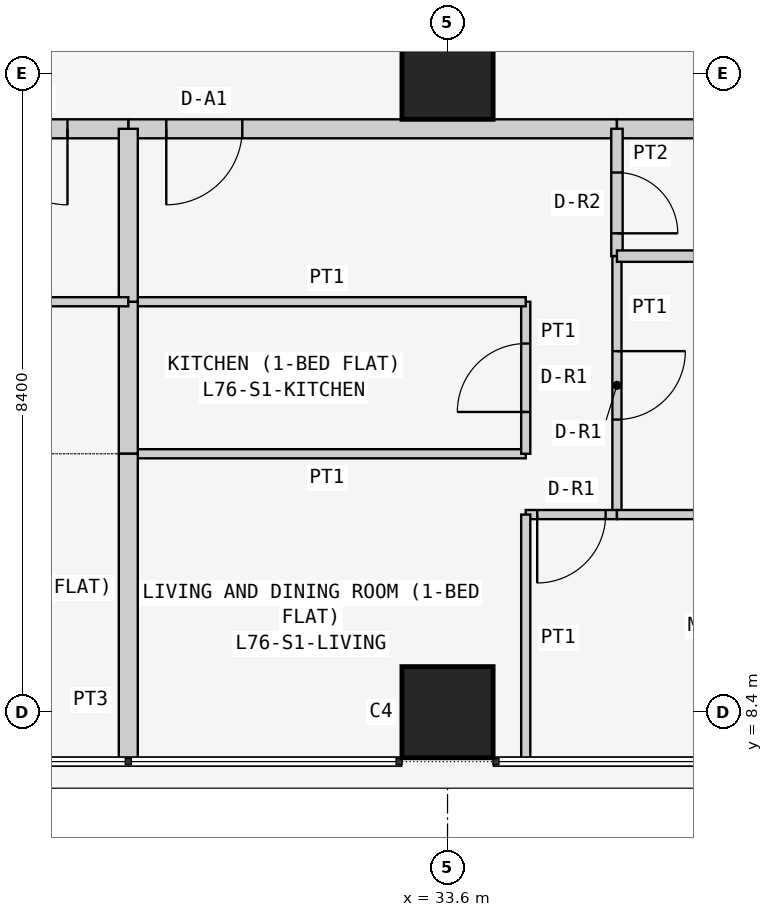
"""IFC4 building model, lengths in metres.
Left out: names, types, materials, properties, quantities, classifications, styles, units other than length and angle.
Written with IfcOpenShell. Run it as: python <this file> out.ifc"""

import sys

from ifc_helpers import new_model, si_unit, direction, frame, frame_2d, origin, origin_2d, place, context, subcontext, project, spatial, rectangle, extrude, element, fill, save


model = new_model("IFC4")
c1 = context("Model", 3, precision=1e-05, world=origin(), true_north=direction((0.0, 1.0)))
c2 = subcontext(c1, "Body", "Model", "MODEL_VIEW")
j1 = project(units=[si_unit("LENGTHUNIT", "METRE"), si_unit("PLANEANGLEUNIT", "RADIAN")], contexts=[c1])
p1 = place(None, origin())
s1 = spatial("IfcSite", under=j1, at=p1, CompositionType="ELEMENT")
p2 = place(p1, origin())
s2 = spatial("IfcBuilding", under=s1, at=p2, CompositionType="ELEMENT")
p3 = place(p2, frame((0.0, 0.0, 290.1)))
s3 = spatial("IfcBuildingStorey", under=s2, at=p3, CompositionType="ELEMENT", Elevation=290.1)
for number, where, z_axis, x_axis in (
    (1, (33.6, 8.4, 0.0), (0.0, 0.0, 1.0), (1.0, 0.0, 0.0)),
    (2, (33.6, 16.8, 0.0), (0.0, 0.0, 1.0), (1.0, 0.0, 0.0)),
):
    element("IfcColumn", number, at=place(p3, frame(where, z_axis=z_axis, x_axis=x_axis)), inside=s3, PredefinedType="COLUMN", context=c2, shape_type="SweptSolid", body=[
        extrude(rectangle(XDim=1.2, YDim=1.2, at=origin_2d()), origin(), (0.0, 0.0, 1.0), 3.6),
    ])
p4 = place(p3, frame((35.829, 16.075, 0.0), z_axis=(0.0, 0.0, 1.0), x_axis=(-1.0, 0.0, 0.0)))
e3 = element("IfcWall", 3, at=p4, inside=s3, PredefinedType="PARTITIONING", context=c2, shape_type="SweptSolid", body=[
    extrude(rectangle(XDim=6.429, YDim=0.25, at=frame_2d((3.215, 0.0))), origin(), (0.0, 0.0, 1.0), 3.45),
])
p5 = place(p4, frame((4.929, 0.0, 0.0)))
e4 = element("IfcOpeningElement", 4, at=p5, cuts=e3, PredefinedType="OPENING", context=c2, shape_type="SweptSolid", body=[
    extrude(rectangle(XDim=1.0, YDim=2.1, at=frame_2d((0.5, 1.05))), frame((0.0, 0.135, 0.0), z_axis=(0.0, -1.0, 0.0), x_axis=(1.0, 0.0, 0.0)), (0.0, 0.0, 1.0), 0.27),
])
p6 = place(p3, frame((42.7, 16.075, 0.0), z_axis=(0.0, 0.0, 1.0), x_axis=(-1.0, 0.0, 0.0)))
e5 = element("IfcWall", 5, at=p6, inside=s3, PredefinedType="PARTITIONING", context=c2, shape_type="SweptSolid", body=[
    extrude(rectangle(XDim=6.871, YDim=0.25, at=frame_2d((3.436, 0.0))), origin(), (0.0, 0.0, 1.0), 3.45),
])
p7 = place(p3, frame((29.4, 16.075, 0.0), z_axis=(0.0, 0.0, 1.0), x_axis=(-1.0, 0.0, 0.0)))
e6 = element("IfcWall", 6, at=p7, inside=s3, PredefinedType="PARTITIONING", context=c2, shape_type="SweptSolid", body=[
    extrude(rectangle(XDim=7.5, YDim=0.25, at=frame_2d((3.75, 0.0))), origin(), (0.0, 0.0, 1.0), 3.45),
])
p8 = place(p7, frame((0.8, 0.0, 0.0)))
e7 = element("IfcOpeningElement", 7, at=p8, cuts=e6, PredefinedType="OPENING", context=c2, shape_type="SweptSolid", body=[
    extrude(rectangle(XDim=1.0, YDim=2.1, at=frame_2d((0.5, 1.05))), frame((0.0, 0.135, 0.0), z_axis=(0.0, -1.0, 0.0), x_axis=(1.0, 0.0, 0.0)), (0.0, 0.0, 1.0), 0.27),
])
p9 = place(p3, frame((29.4, 11.8, 0.0), z_axis=(0.0, 0.0, 1.0), x_axis=(1.0, 0.0, 0.0)))
e8 = element("IfcWall", 8, at=p9, inside=s3, PredefinedType="PARTITIONING", context=c2, shape_type="SweptSolid", body=[
    extrude(rectangle(XDim=5.229, YDim=0.12, at=frame_2d((2.615, 0.0))), origin(), (0.0, 0.0, 1.0), 3.45),
])
p10 = place(p3, frame((34.629, 11.8, 0.0), z_axis=(0.0, 0.0, 1.0), x_axis=(0.0, 1.0, 0.0)))
e9 = element("IfcWall", 9, at=p10, inside=s3, PredefinedType="PARTITIONING", context=c2, shape_type="SweptSolid", body=[
    extrude(rectangle(XDim=2.0, YDim=0.12, at=frame_2d((1.0, 0.0))), origin(), (0.0, 0.0, 1.0), 3.45),
])
p11 = place(p10, frame((0.55, 0.0, 0.0)))
e10 = element("IfcOpeningElement", 10, at=p11, cuts=e9, PredefinedType="OPENING", context=c2, shape_type="SweptSolid", body=[
    extrude(rectangle(XDim=0.9, YDim=2.1, at=frame_2d((0.45, 1.05))), frame((0.0, 0.07, 0.0), z_axis=(0.0, -1.0, 0.0), x_axis=(1.0, 0.0, 0.0)), (0.0, 0.0, 1.0), 0.14),
])
p12 = place(p3, frame((34.629, 13.8, 0.0), z_axis=(0.0, 0.0, 1.0), x_axis=(-1.0, 0.0, 0.0)))
e11 = element("IfcWall", 11, at=p12, inside=s3, PredefinedType="PARTITIONING", context=c2, shape_type="SweptSolid", body=[
    extrude(rectangle(XDim=5.229, YDim=0.12, at=frame_2d((2.615, 0.0))), origin(), (0.0, 0.0, 1.0), 3.45),
])
p13 = place(p3, frame((29.4, 13.8, 0.0), z_axis=(0.0, 0.0, 1.0), x_axis=(0.0, -1.0, 0.0)))
e12 = element("IfcWall", 12, at=p13, inside=s3, PredefinedType="PARTITIONING", context=c2, shape_type="SweptSolid", body=[
    extrude(rectangle(XDim=2.0, YDim=0.25, at=frame_2d((1.0, 0.0))), origin(), (0.0, 0.0, 1.0), 2.848),
])
p14 = place(p3, frame((35.829, 16.075, 0.0), z_axis=(0.0, 0.0, 1.0), x_axis=(0.0, -1.0, 0.0)))
e13 = element("IfcWall", 13, at=p14, inside=s3, PredefinedType="PARTITIONING", context=c2, shape_type="SweptSolid", body=[
    extrude(rectangle(XDim=1.675, YDim=0.15, at=frame_2d((0.837, 0.0))), origin(), (0.0, 0.0, 1.0), 3.45),
])
p15 = place(p14, frame((0.575, 0.0, 0.0)))
e14 = element("IfcOpeningElement", 14, at=p15, cuts=e13, PredefinedType="OPENING", context=c2, shape_type="SweptSolid", body=[
    extrude(rectangle(XDim=0.8, YDim=2.1, at=frame_2d((0.4, 1.05))), frame((0.0, 0.085, 0.0), z_axis=(0.0, -1.0, 0.0), x_axis=(1.0, 0.0, 0.0)), (0.0, 0.0, 1.0), 0.17),
])
p16 = place(p3, frame((35.829, 14.4, 0.0), z_axis=(0.0, 0.0, 1.0), x_axis=(0.0, -1.0, 0.0)))
e15 = element("IfcWall", 15, at=p16, inside=s3, PredefinedType="PARTITIONING", context=c2, shape_type="SweptSolid", body=[
    extrude(rectangle(XDim=3.4, YDim=0.12, at=frame_2d((1.7, 0.0))), origin(), (0.0, 0.0, 1.0), 3.45),
])
p17 = place(p16, frame((1.25, 0.0, 0.0)))
e16 = element("IfcOpeningElement", 16, at=p17, cuts=e15, PredefinedType="OPENING", context=c2, shape_type="SweptSolid", body=[
    extrude(rectangle(XDim=0.9, YDim=2.1, at=frame_2d((0.45, 1.05))), frame((0.0, 0.07, 0.0), z_axis=(0.0, -1.0, 0.0), x_axis=(1.0, 0.0, 0.0)), (0.0, 0.0, 1.0), 0.14),
])
p18 = place(p3, frame((35.829, 11.0, 0.0), z_axis=(0.0, 0.0, 1.0), x_axis=(-1.0, 0.0, 0.0)))
e17 = element("IfcWall", 17, at=p18, inside=s3, PredefinedType="PARTITIONING", context=c2, shape_type="SweptSolid", body=[
    extrude(rectangle(XDim=1.2, YDim=0.12, at=frame_2d((0.6, 0.0))), origin(), (0.0, 0.0, 1.0), 3.45),
])
p19 = place(p18, frame((0.149, 0.0, 0.0)))
e18 = element("IfcOpeningElement", 18, at=p19, cuts=e17, PredefinedType="OPENING", context=c2, shape_type="SweptSolid", body=[
    extrude(rectangle(XDim=0.9, YDim=2.1, at=frame_2d((0.45, 1.05))), frame((0.0, 0.07, 0.0), z_axis=(0.0, -1.0, 0.0), x_axis=(1.0, 0.0, 0.0)), (0.0, 0.0, 1.0), 0.14),
])
p20 = place(p3, frame((34.629, 11.0, 0.0), z_axis=(0.0, 0.0, 1.0), x_axis=(0.0, -1.0, 0.0)))
e19 = element("IfcWall", 19, at=p20, inside=s3, PredefinedType="PARTITIONING", context=c2, shape_type="SweptSolid", body=[
    extrude(rectangle(XDim=3.25, YDim=0.12, at=frame_2d((1.625, 0.0))), origin(), (0.0, 0.0, 1.0), 3.45),
])
p21 = place(p3, frame((29.4, 13.8, 0.0), z_axis=(0.0, 0.0, 1.0), x_axis=(0.0, 1.0, 0.0)))
e20 = element("IfcWall", 20, at=p21, inside=s3, PredefinedType="PARTITIONING", context=c2, shape_type="SweptSolid", body=[
    extrude(rectangle(XDim=2.275, YDim=0.25, at=frame_2d((1.137, 0.0))), origin(), (0.0, 0.0, 1.0), 2.848),
])
p22 = place(p3, frame((29.4, 7.75, 0.0), z_axis=(0.0, 0.0, 1.0), x_axis=(0.0, 1.0, 0.0)))
e21 = element("IfcWall", 21, at=p22, inside=s3, PredefinedType="PARTITIONING", context=c2, shape_type="SweptSolid", body=[
    extrude(rectangle(XDim=4.05, YDim=0.25, at=frame_2d((2.025, 0.0))), origin(), (0.0, 0.0, 1.0), 2.848),
])
p23 = place(p3, frame((35.829, 14.4, 0.0), z_axis=(0.0, 0.0, 1.0), x_axis=(1.0, 0.0, 0.0)))
e22 = element("IfcWall", 22, at=p23, inside=s3, PredefinedType="PARTITIONING", context=c2, shape_type="SweptSolid", body=[
    extrude(rectangle(XDim=6.871, YDim=0.15, at=frame_2d((3.436, 0.0))), origin(), (0.0, 0.0, 1.0), 3.45),
])
p24 = place(p3, frame((35.829, 11.0, 0.0), z_axis=(0.0, 0.0, 1.0), x_axis=(1.0, 0.0, 0.0)))
e23 = element("IfcWall", 23, at=p24, inside=s3, PredefinedType="PARTITIONING", context=c2, shape_type="SweptSolid", body=[
    extrude(rectangle(XDim=6.871, YDim=0.12, at=frame_2d((3.436, 0.0))), origin(), (0.0, 0.0, 1.0), 3.45),
])
p25 = place(p3, frame((29.4, 13.8, 0.0), z_axis=(0.0, 0.0, 1.0), x_axis=(-1.0, 0.0, 0.0)))
e24 = element("IfcWall", 24, at=p25, inside=s3, PredefinedType="PARTITIONING", context=c2, shape_type="SweptSolid", body=[
    extrude(rectangle(XDim=4.5, YDim=0.12, at=frame_2d((2.25, 0.0))), origin(), (0.0, 0.0, 1.0), 3.45),
])
p26 = place(p25, frame((1.55, 0.0, 0.0)))
e25 = element("IfcOpeningElement", 25, at=p26, cuts=e24, PredefinedType="OPENING", context=c2, shape_type="SweptSolid", body=[
    extrude(rectangle(XDim=0.9, YDim=2.1, at=frame_2d((0.45, 1.05))), frame((0.0, 0.07, 0.0), z_axis=(0.0, -1.0, 0.0), x_axis=(1.0, 0.0, 0.0)), (0.0, 0.0, 1.0), 0.14),
])
p27 = place(p5, origin())
e26 = element("IfcDoor", 26, at=p27, inside=s3, OperationType="SINGLE_SWING_RIGHT", PredefinedType="DOOR", context=c2, shape_type="SweptSolid", body=[
    extrude(rectangle(XDim=1.0, YDim=2.1, at=frame_2d((0.5, 1.05))), frame((0.0, 0.025, 0.0), z_axis=(0.0, -1.0, 0.0), x_axis=(1.0, 0.0, 0.0)), (0.0, 0.0, 1.0), 0.05),
])
fill(e4, e26)
p28 = place(p11, origin())
e27 = element("IfcDoor", 27, at=p28, inside=s3, OperationType="SINGLE_SWING_LEFT", PredefinedType="DOOR", context=c2, shape_type="SweptSolid", body=[
    extrude(rectangle(XDim=0.9, YDim=2.1, at=frame_2d((0.45, 1.05))), frame((0.0, 0.025, 0.0), z_axis=(0.0, -1.0, 0.0), x_axis=(1.0, 0.0, 0.0)), (0.0, 0.0, 1.0), 0.05),
])
fill(e10, e27)
p29 = place(p15, origin())
e28 = element("IfcDoor", 28, at=p29, inside=s3, OperationType="SINGLE_SWING_RIGHT", PredefinedType="DOOR", context=c2, shape_type="SweptSolid", body=[
    extrude(rectangle(XDim=0.8, YDim=2.1, at=frame_2d((0.4, 1.05))), frame((0.0, 0.025, 0.0), z_axis=(0.0, -1.0, 0.0), x_axis=(1.0, 0.0, 0.0)), (0.0, 0.0, 1.0), 0.05),
])
fill(e14, e28)
p30 = place(p17, origin())
e29 = element("IfcDoor", 29, at=p30, inside=s3, OperationType="SINGLE_SWING_LEFT", PredefinedType="DOOR", context=c2, shape_type="SweptSolid", body=[
    extrude(rectangle(XDim=0.9, YDim=2.1, at=frame_2d((0.45, 1.05))), frame((0.0, 0.025, 0.0), z_axis=(0.0, -1.0, 0.0), x_axis=(1.0, 0.0, 0.0)), (0.0, 0.0, 1.0), 0.05),
])
fill(e16, e29)
p31 = place(p19, origin())
e30 = element("IfcDoor", 30, at=p31, inside=s3, OperationType="SINGLE_SWING_RIGHT", PredefinedType="DOOR", context=c2, shape_type="SweptSolid", body=[
    extrude(rectangle(XDim=0.9, YDim=2.1, at=frame_2d((0.45, 1.05))), frame((0.0, 0.025, 0.0), z_axis=(0.0, -1.0, 0.0), x_axis=(1.0, 0.0, 0.0)), (0.0, 0.0, 1.0), 0.05),
])
fill(e18, e30)
p32 = place(p8, origin())
e31 = element("IfcDoor", 31, at=p32, inside=s3, OperationType="SINGLE_SWING_LEFT", PredefinedType="DOOR", context=c2, shape_type="SweptSolid", body=[
    extrude(rectangle(XDim=1.0, YDim=2.1, at=frame_2d((0.5, 1.05))), frame((0.0, 0.025, 0.0), z_axis=(0.0, -1.0, 0.0), x_axis=(1.0, 0.0, 0.0)), (0.0, 0.0, 1.0), 0.05),
])
fill(e7, e31)
save(model, sys.argv[1])
